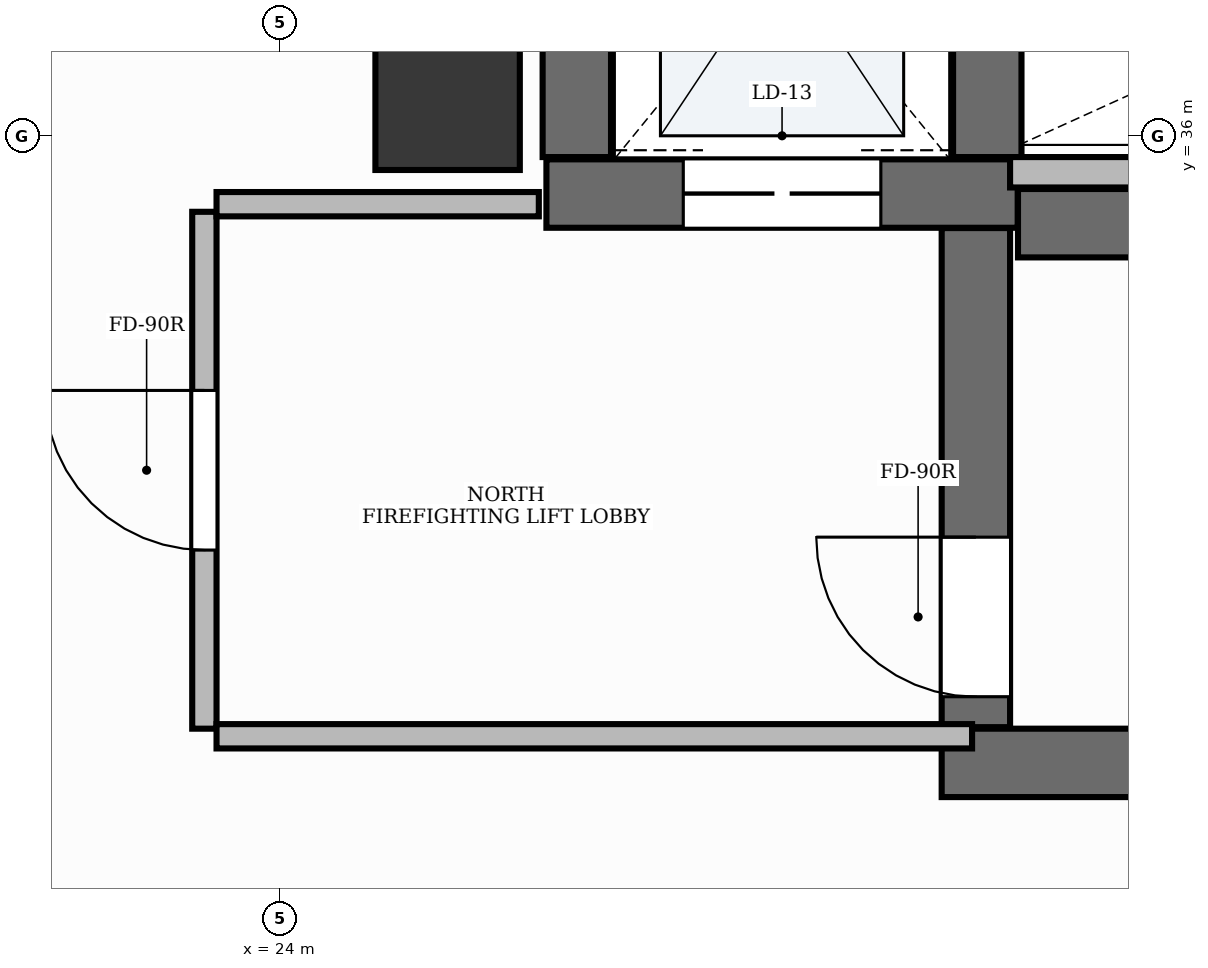
"""IFC4 building model, lengths in metres.
Left out: names, types, materials, properties, quantities, classifications, styles, units other than length and angle.
Written with IfcOpenShell. Run it as: python <this file> out.ifc"""

import sys

from ifc_helpers import new_model, si_unit, direction, frame, frame_2d, origin, origin_2d, place, context, subcontext, project, spatial, rectangle, extrude, element, fill, save


model = new_model("IFC4")
c1 = context("Model", 3, precision=1e-05, world=origin(), true_north=direction((0.0, 1.0)))
c2 = subcontext(c1, "Body", "Model", "MODEL_VIEW")
j1 = project(units=[si_unit("LENGTHUNIT", "METRE"), si_unit("PLANEANGLEUNIT", "RADIAN")], contexts=[c1])
p1 = place(None, origin())
s1 = spatial("IfcSite", under=j1, at=p1, CompositionType="ELEMENT")
p2 = place(p1, origin())
s2 = spatial("IfcBuilding", under=s1, at=p2, CompositionType="ELEMENT")
p3 = place(p2, frame((0.0, 0.0, 25.8)))
s3 = spatial("IfcBuildingStorey", under=s2, at=p3, CompositionType="ELEMENT", Elevation=25.8)
p4 = place(p3, frame((28.852, 35.425, 0.0), z_axis=(0.0, 0.0, 1.0), x_axis=(1.0, 0.0, 0.0)))
e1 = element("IfcWall", 1, at=p4, inside=s3, PredefinedType="SHEAR", context=c2, shape_type="SweptSolid", body=[
    extrude(rectangle(XDim=8.248, YDim=0.45, at=frame_2d((4.124, 0.0))), origin(), (0.0, 0.0, 1.0), 3.9),
])
p5 = place(p3, frame((28.35, 31.875, 0.0), z_axis=(0.0, 0.0, 1.0), x_axis=(1.0, 0.0, 0.0)))
e2 = element("IfcWall", 2, at=p5, inside=s3, PredefinedType="SHEAR", context=c2, shape_type="SweptSolid", body=[
    extrude(rectangle(XDim=8.75, YDim=0.45, at=frame_2d((4.375, 0.0))), origin(), (0.0, 0.0, 1.0), 3.9),
])
p6 = place(p3, frame((28.575, 32.11, 0.0), z_axis=(0.0, 0.0, 1.0), x_axis=(0.0, 1.0, 0.0)))
e3 = element("IfcWall", 3, at=p6, inside=s3, PredefinedType="SHEAR", context=c2, shape_type="SweptSolid", body=[
    extrude(rectangle(XDim=3.283, YDim=0.45, at=frame_2d((1.642, 0.0))), origin(), (0.0, 0.0, 1.0), 3.9),
])
p7 = place(p6, frame((0.2, 0.0, 0.0)))
e4 = element("IfcOpeningElement", 4, at=p7, cuts=e3, PredefinedType="OPENING", context=c2, shape_type="SweptSolid", body=[
    extrude(rectangle(XDim=1.05, YDim=2.15, at=frame_2d((0.525, 1.075))), frame((0.0, 0.24, 0.0), z_axis=(0.0, -1.0, 0.0), x_axis=(1.0, 0.0, 0.0)), (0.0, 0.0, 1.0), 0.48),
])
p8 = place(p3, frame((25.75, 35.62, 0.0), z_axis=(0.0, 0.0, 1.0), x_axis=(1.0, 0.0, 0.0)))
e5 = element("IfcWall", 5, at=p8, inside=s3, PredefinedType="SHEAR", context=c2, shape_type="SweptSolid", body=[
    extrude(rectangle(XDim=3.1, YDim=0.45, at=frame_2d((1.55, 0.0))), origin(), (0.0, 0.0, 1.0), 3.9),
])
p9 = place(p8, frame((0.9, 0.0, 0.0)))
e6 = element("IfcOpeningElement", 6, at=p9, cuts=e5, PredefinedType="OPENING", context=c2, shape_type="SweptSolid", body=[
    extrude(rectangle(XDim=1.3, YDim=2.2, at=frame_2d((0.65, 1.1))), frame((0.0, 0.24, 0.0), z_axis=(0.0, -1.0, 0.0), x_axis=(1.0, 0.0, 0.0)), (0.0, 0.0, 1.0), 0.48),
])
for number, where, z_axis, x_axis in (
    (7, (25.95, 35.86, 0.0), (0.0, 0.0, 1.0), (0.0, 1.0, 0.0)),
    (8, (28.65, 35.86, 0.0), (0.0, 0.0, 1.0), (0.0, 1.0, 0.0)),
):
    element("IfcWall", number, at=place(p3, frame(where, z_axis=z_axis, x_axis=x_axis)), inside=s3, PredefinedType="SHEAR", context=c2, shape_type="SweptSolid", body=[
        extrude(rectangle(XDim=2.7, YDim=0.45, at=frame_2d((1.35, 0.0))), origin(), (0.0, 0.0, 1.0), 3.9),
    ])
p10 = place(p3, frame((25.1, 36.25, -0.0), z_axis=(0.0, 0.0, 1.0), x_axis=(1.0, 0.0, 0.0)))
e9 = element("IfcColumn", 9, at=p10, inside=s3, PredefinedType="PILASTER", context=c2, shape_type="SweptSolid", body=[
    extrude(rectangle(XDim=0.95, YDim=0.95, at=origin_2d()), origin(), (0.0, 0.0, 1.0), 3.901),
])
p11 = place(p3, frame((28.8, 35.76, 0.0), z_axis=(0.0, 0.0, 1.0), x_axis=(1.0, 0.0, 0.0)))
e10 = element("IfcWall", 10, at=p11, inside=s3, PredefinedType="PARTITIONING", context=c2, shape_type="SweptSolid", body=[
    extrude(rectangle(XDim=4.57, YDim=0.2, at=frame_2d((2.285, 0.0))), origin(), (0.0, 0.0, 1.0), 2.91),
])
p12 = place(p3, frame((23.5, 32.1, 0.0), z_axis=(0.0, 0.0, 1.0), x_axis=(0.0, 1.0, 0.0)))
e11 = element("IfcWall", 11, at=p12, inside=s3, PredefinedType="PARTITIONING", context=c2, shape_type="SweptSolid", body=[
    extrude(rectangle(XDim=3.4, YDim=0.16, at=frame_2d((1.7, 0.0))), origin(), (0.0, 0.0, 1.0), 2.91),
])
p13 = place(p12, frame((1.175, 0.0, 0.0)))
e12 = element("IfcOpeningElement", 12, at=p13, cuts=e11, PredefinedType="OPENING", context=c2, shape_type="SweptSolid", body=[
    extrude(rectangle(XDim=1.05, YDim=2.15, at=frame_2d((0.525, 1.075))), frame((0.0, 0.095, 0.0), z_axis=(0.0, -1.0, 0.0), x_axis=(1.0, 0.0, 0.0)), (0.0, 0.0, 1.0), 0.19),
])
p14 = place(p3, frame((23.58, 32.05, 0.0), z_axis=(0.0, 0.0, 1.0), x_axis=(1.0, 0.0, 0.0)))
e13 = element("IfcWall", 13, at=p14, inside=s3, PredefinedType="PARTITIONING", context=c2, shape_type="SweptSolid", body=[
    extrude(rectangle(XDim=4.97, YDim=0.16, at=frame_2d((2.485, 0.0))), origin(), (0.0, 0.0, 1.0), 2.91),
])
p15 = place(p3, frame((23.58, 35.55, 0.0), z_axis=(0.0, 0.0, 1.0), x_axis=(1.0, 0.0, 0.0)))
e14 = element("IfcWall", 14, at=p15, inside=s3, PredefinedType="PARTITIONING", context=c2, shape_type="SweptSolid", body=[
    extrude(rectangle(XDim=2.12, YDim=0.16, at=frame_2d((1.06, 0.0))), origin(), (0.0, 0.0, 1.0), 2.91),
])
p16 = place(p7, origin())
e15 = element("IfcDoor", 15, at=p16, inside=s3, OperationType="SINGLE_SWING_RIGHT", PredefinedType="DOOR", context=c2, shape_type="SweptSolid", body=[
    extrude(rectangle(XDim=1.05, YDim=2.15, at=frame_2d((0.525, 1.075))), frame((0.0, 0.025, 0.0), z_axis=(0.0, -1.0, 0.0), x_axis=(1.0, 0.0, 0.0)), (0.0, 0.0, 1.0), 0.05),
])
fill(e4, e15)
p17 = place(p9, origin())
e16 = element("IfcDoor", 16, at=p17, inside=s3, OperationType="DOUBLE_DOOR_SLIDING", PredefinedType="DOOR", context=c2, shape_type="SweptSolid", body=[
    extrude(rectangle(XDim=1.3, YDim=2.2, at=frame_2d((0.65, 1.1))), frame((0.0, 0.025, 0.0), z_axis=(0.0, -1.0, 0.0), x_axis=(1.0, 0.0, 0.0)), (0.0, 0.0, 1.0), 0.05),
])
fill(e6, e16)
p18 = place(p13, origin())
e17 = element("IfcDoor", 17, at=p18, inside=s3, OperationType="SINGLE_SWING_RIGHT", PredefinedType="DOOR", context=c2, shape_type="SweptSolid", body=[
    extrude(rectangle(XDim=1.05, YDim=2.15, at=frame_2d((0.525, 1.075))), frame((0.0, 0.025, 0.0), z_axis=(0.0, -1.0, 0.0), x_axis=(1.0, 0.0, 0.0)), (0.0, 0.0, 1.0), 0.05),
])
fill(e12, e17)
save(model, sys.argv[1])
